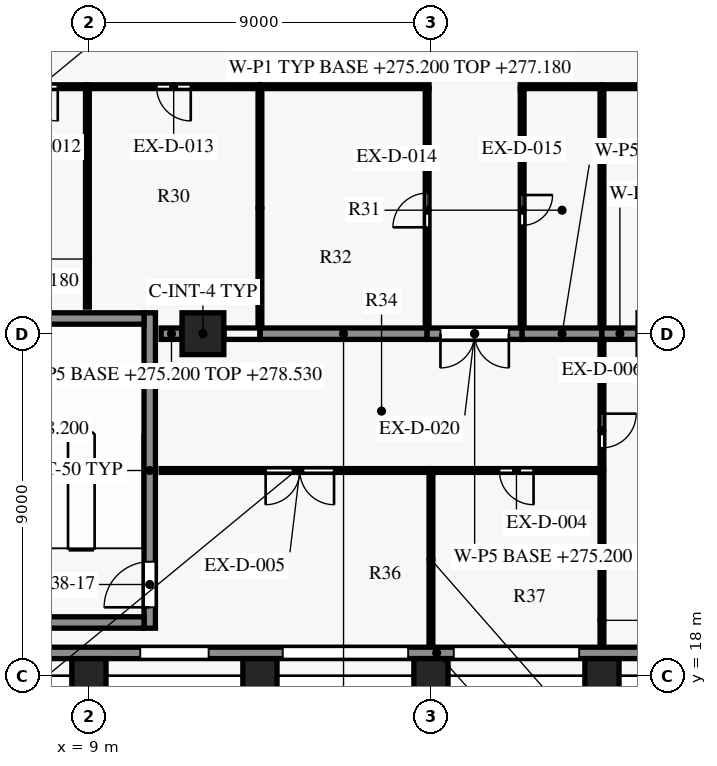
"""IFC4 building model, lengths in metres.
Left out: names, types, materials, properties, quantities, classifications, styles, units other than length and angle.
Written with IfcOpenShell. Run it as: python <this file> out.ifc"""

import sys

from ifc_helpers import new_model, si_unit, direction, frame, frame_2d, origin, origin_2d, place, context, subcontext, project, spatial, rectangle, extrude, element, fill, save


model = new_model("IFC4")
c1 = context("Model", 3, precision=1e-05, world=origin(), true_north=direction((0.0, 1.0)))
c2 = subcontext(c1, "Body", "Model", "MODEL_VIEW")
j1 = project(units=[si_unit("LENGTHUNIT", "METRE"), si_unit("PLANEANGLEUNIT", "RADIAN")], contexts=[c1])
p1 = place(None, origin())
s1 = spatial("IfcSite", under=j1, at=p1, CompositionType="ELEMENT")
p2 = place(p1, origin())
s2 = spatial("IfcBuilding", under=s1, at=p2, CompositionType="ELEMENT")
p3 = place(p2, frame((0.0, 0.0, 275.2)))
s3 = spatial("IfcBuildingStorey", under=s2, at=p3, CompositionType="ELEMENT", Elevation=275.2)
for number, where, z_axis, x_axis in (
    (1, (9.0, 18.0, 0.0), (0.0, 0.0, 1.0), (1.0, 0.0, 0.0)),
    (2, (13.5, 18.0, 0.0), (0.0, 0.0, 1.0), (1.0, 0.0, 0.0)),
    (3, (18.0, 18.0, 0.0), (0.0, 0.0, 1.0), (1.0, 0.0, 0.0)),
    (4, (22.5, 18.0, 0.0), (0.0, 0.0, 1.0), (1.0, 0.0, 0.0)),
):
    element("IfcColumn", number, at=place(p3, frame(where, z_axis=z_axis, x_axis=x_axis)), inside=s3, PredefinedType="COLUMN", context=c2, shape_type="SweptSolid", body=[
        extrude(rectangle(XDim=0.9, YDim=0.9, at=origin_2d()), origin(), (0.0, 0.0, 1.0), 3.8),
    ])
p4 = place(p3, frame((12.0, 27.0, 0.0), z_axis=(0.0, 0.0, 1.0), x_axis=(1.0, 0.0, 0.0)))
e5 = element("IfcColumn", 5, at=p4, inside=s3, PredefinedType="COLUMN", context=c2, shape_type="SweptSolid", body=[
    extrude(rectangle(XDim=1.1, YDim=1.1, at=origin_2d()), origin(), (0.0, 0.0, 1.0), 3.8),
])
p5 = place(p3, frame((31.05, 18.6, 0.0), z_axis=(0.0, 0.0, 1.0), x_axis=(-1.0, 0.0, 0.0)))
e6 = element("IfcWall", 6, at=p5, inside=s3, PredefinedType="SOLIDWALL", context=c2, shape_type="SweptSolid", body=[
    extrude(rectangle(XDim=25.8, YDim=0.3, at=frame_2d((12.9, 0.0))), origin(), (0.0, 0.0, 1.0), 3.0),
])
p6 = place(p5, frame((0.9, 0.0, 0.75)))
e7 = element("IfcOpeningElement", 7, at=p6, cuts=e6, PredefinedType="OPENING", context=c2, shape_type="SweptSolid", body=[
    extrude(rectangle(XDim=1.8, YDim=1.8, at=frame_2d((0.9, 0.9))), frame((0.0, 0.16, 0.0), z_axis=(0.0, -1.0, 0.0), x_axis=(1.0, 0.0, 0.0)), (0.0, 0.0, 1.0), 0.32),
])
p7 = place(p5, frame((5.4, 0.0, 0.75)))
e8 = element("IfcOpeningElement", 8, at=p7, cuts=e6, PredefinedType="OPENING", context=c2, shape_type="SweptSolid", body=[
    extrude(rectangle(XDim=1.8, YDim=1.8, at=frame_2d((0.9, 0.9))), frame((0.0, 0.16, 0.0), z_axis=(0.0, -1.0, 0.0), x_axis=(1.0, 0.0, 0.0)), (0.0, 0.0, 1.0), 0.32),
])
p8 = place(p5, frame((9.15, 0.0, 0.15)))
e9 = element("IfcOpeningElement", 9, at=p8, cuts=e6, PredefinedType="OPENING", context=c2, shape_type="SweptSolid", body=[
    extrude(rectangle(XDim=3.3, YDim=2.4, at=frame_2d((1.65, 1.2))), frame((0.0, 0.16, 0.0), z_axis=(0.0, -1.0, 0.0), x_axis=(1.0, 0.0, 0.0)), (0.0, 0.0, 1.0), 0.32),
])
p9 = place(p5, frame((13.65, 0.0, 0.15)))
e10 = element("IfcOpeningElement", 10, at=p9, cuts=e6, PredefinedType="OPENING", context=c2, shape_type="SweptSolid", body=[
    extrude(rectangle(XDim=3.3, YDim=2.4, at=frame_2d((1.65, 1.2))), frame((0.0, 0.16, 0.0), z_axis=(0.0, -1.0, 0.0), x_axis=(1.0, 0.0, 0.0)), (0.0, 0.0, 1.0), 0.32),
])
p10 = place(p5, frame((18.9, 0.0, 0.75)))
e11 = element("IfcOpeningElement", 11, at=p10, cuts=e6, PredefinedType="OPENING", context=c2, shape_type="SweptSolid", body=[
    extrude(rectangle(XDim=1.8, YDim=1.8, at=frame_2d((0.9, 0.9))), frame((0.0, 0.16, 0.0), z_axis=(0.0, -1.0, 0.0), x_axis=(1.0, 0.0, 0.0)), (0.0, 0.0, 1.0), 0.32),
])
for number, where, z_axis, x_axis in (
    (12, (7.15, 19.4, 0.0), (0.0, 0.0, 1.0), (1.0, 0.0, 0.0)),
    (13, (7.15, 27.4, 0.0), (0.0, 0.0, 1.0), (1.0, 0.0, 0.0)),
):
    element("IfcWall", number, at=place(p3, frame(where, z_axis=z_axis, x_axis=x_axis)), inside=s3, PredefinedType="SHEAR", context=c2, shape_type="SweptSolid", body=[
        extrude(rectangle(XDim=3.3, YDim=0.3, at=frame_2d((1.65, 0.0))), origin(), (0.0, 0.0, 1.0), 3.5),
    ])
p11 = place(p3, frame((10.6, 19.25, 0.0), z_axis=(0.0, 0.0, 1.0), x_axis=(0.0, 1.0, 0.0)))
e14 = element("IfcWall", 14, at=p11, inside=s3, PredefinedType="SHEAR", context=c2, shape_type="SweptSolid", body=[
    extrude(rectangle(XDim=8.3, YDim=0.3, at=frame_2d((4.15, 0.0))), origin(), (0.0, 0.0, 1.0), 3.5),
])
p12 = place(p11, frame((0.55, 0.0, 0.0)))
e15 = element("IfcOpeningElement", 15, at=p12, cuts=e14, PredefinedType="OPENING", context=c2, shape_type="SweptSolid", body=[
    extrude(rectangle(XDim=1.2, YDim=2.2, at=frame_2d((0.6, 1.1))), frame((0.0, 0.16, 0.0), z_axis=(0.0, -1.0, 0.0), x_axis=(1.0, 0.0, 0.0)), (0.0, 0.0, 1.0), 0.32),
])
p13 = place(p3, frame((18.0, 18.77, 0.0), z_axis=(0.0, 0.0, 1.0), x_axis=(0.0, 1.0, 0.0)))
e16 = element("IfcWall", 16, at=p13, inside=s3, PredefinedType="PARTITIONING", context=c2, shape_type="SweptSolid", body=[
    extrude(rectangle(XDim=4.58, YDim=0.1, at=frame_2d((2.29, 0.0))), origin(), (0.0, 0.0, 1.0), 2.98),
])
p14 = place(p3, frame((22.5, 23.35, 0.0), z_axis=(0.0, 0.0, 1.0), x_axis=(0.0, -1.0, 0.0)))
e17 = element("IfcWall", 17, at=p14, inside=s3, PredefinedType="PARTITIONING", context=c2, shape_type="SweptSolid", body=[
    extrude(rectangle(XDim=4.58, YDim=0.1, at=frame_2d((2.29, 0.0))), origin(), (0.0, 0.0, 1.0), 3.33),
])
p15 = place(p3, frame((18.0, 23.4, 0.0), z_axis=(0.0, 0.0, 1.0), x_axis=(-1.0, 0.0, 0.0)))
e18 = element("IfcWall", 18, at=p15, inside=s3, PredefinedType="PARTITIONING", context=c2, shape_type="SweptSolid", body=[
    extrude(rectangle(XDim=7.1, YDim=0.1, at=frame_2d((3.55, 0.0))), origin(), (0.0, 0.0, 1.0), 2.73),
])
p16 = place(p15, frame((2.55, 0.0, 0.0)))
e19 = element("IfcOpeningElement", 19, at=p16, cuts=e18, PredefinedType="OPENING", context=c2, shape_type="SweptSolid", body=[
    extrude(rectangle(XDim=1.8, YDim=2.1, at=frame_2d((0.9, 1.05))), frame((0.0, 0.06, 0.0), z_axis=(0.0, -1.0, 0.0), x_axis=(1.0, 0.0, 0.0)), (0.0, 0.0, 1.0), 0.12),
])
p17 = place(p3, frame((22.45, 23.4, 0.0), z_axis=(0.0, 0.0, 1.0), x_axis=(-1.0, 0.0, 0.0)))
e20 = element("IfcWall", 20, at=p17, inside=s3, PredefinedType="PARTITIONING", context=c2, shape_type="SweptSolid", body=[
    extrude(rectangle(XDim=4.45, YDim=0.1, at=frame_2d((2.225, 0.0))), origin(), (0.0, 0.0, 1.0), 2.98),
])
p18 = place(p17, frame((1.75, 0.0, 0.0)))
e21 = element("IfcOpeningElement", 21, at=p18, cuts=e20, PredefinedType="OPENING", context=c2, shape_type="SweptSolid", body=[
    extrude(rectangle(XDim=0.9, YDim=2.1, at=frame_2d((0.45, 1.05))), frame((0.0, 0.06, 0.0), z_axis=(0.0, -1.0, 0.0), x_axis=(1.0, 0.0, 0.0)), (0.0, 0.0, 1.0), 0.12),
])
p19 = place(p3, frame((22.5, 26.83, 0.0), z_axis=(0.0, 0.0, 1.0), x_axis=(0.0, -1.0, 0.0)))
e22 = element("IfcWall", 22, at=p19, inside=s3, PredefinedType="PARTITIONING", context=c2, shape_type="SweptSolid", body=[
    extrude(rectangle(XDim=3.38, YDim=0.1, at=frame_2d((1.69, 0.0))), origin(), (0.0, 0.0, 1.0), 1.98),
])
p20 = place(p19, frame((1.935, 0.0, 0.0)))
e23 = element("IfcOpeningElement", 23, at=p20, cuts=e22, PredefinedType="OPENING", context=c2, shape_type="SweptSolid", body=[
    extrude(rectangle(XDim=0.9, YDim=2.1, at=frame_2d((0.45, 1.05))), frame((0.0, 0.06, 0.0), z_axis=(0.0, -1.0, 0.0), x_axis=(1.0, 0.0, 0.0)), (0.0, 0.0, 1.0), 0.12),
])
p21 = place(p3, frame((10.9, 27.0, 0.0), z_axis=(0.0, 0.0, 1.0), x_axis=(1.0, 0.0, 0.0)))
e24 = element("IfcWall", 24, at=p21, inside=s3, PredefinedType="PARTITIONING", context=c2, shape_type="SweptSolid", body=[
    extrude(rectangle(XDim=0.545, YDim=0.3, at=frame_2d((0.272, 0.0))), origin(), (0.0, 0.0, 1.0), 3.33),
])
p22 = place(p3, frame((12.555, 27.0, 0.0), z_axis=(0.0, 0.0, 1.0), x_axis=(1.0, 0.0, 0.0)))
e25 = element("IfcWall", 25, at=p22, inside=s3, PredefinedType="PARTITIONING", context=c2, shape_type="SweptSolid", body=[
    extrude(rectangle(XDim=0.945, YDim=0.3, at=frame_2d((0.473, 0.0))), origin(), (0.0, 0.0, 1.0), 1.98),
])
p23 = place(p3, frame((13.5, 27.0, 0.0), z_axis=(0.0, 0.0, 1.0), x_axis=(1.0, 0.0, 0.0)))
e26 = element("IfcWall", 26, at=p23, inside=s3, PredefinedType="PARTITIONING", context=c2, shape_type="SweptSolid", body=[
    extrude(rectangle(XDim=4.4, YDim=0.3, at=frame_2d((2.2, 0.0))), origin(), (0.0, 0.0, 1.0), 1.98),
])
p24 = place(p3, frame((20.4, 27.0, 0.0), z_axis=(0.0, 0.0, 1.0), x_axis=(-1.0, 0.0, 0.0)))
e27 = element("IfcWall", 27, at=p24, inside=s3, PredefinedType="PARTITIONING", context=c2, shape_type="SweptSolid", body=[
    extrude(rectangle(XDim=2.5, YDim=0.3, at=frame_2d((1.25, 0.0))), origin(), (0.0, 0.0, 1.0), 2.73),
])
p25 = place(p24, frame((0.35, 0.0, 0.0)))
e28 = element("IfcOpeningElement", 28, at=p25, cuts=e27, PredefinedType="OPENING", context=c2, shape_type="SweptSolid", body=[
    extrude(rectangle(XDim=1.8, YDim=2.1, at=frame_2d((0.9, 1.05))), frame((0.0, 0.16, 0.0), z_axis=(0.0, -1.0, 0.0), x_axis=(1.0, 0.0, 0.0)), (0.0, 0.0, 1.0), 0.32),
])
p26 = place(p3, frame((20.4, 27.0, 0.0), z_axis=(0.0, 0.0, 1.0), x_axis=(1.0, 0.0, 0.0)))
e29 = element("IfcWall", 29, at=p26, inside=s3, PredefinedType="PARTITIONING", context=c2, shape_type="SweptSolid", body=[
    extrude(rectangle(XDim=2.1, YDim=0.3, at=frame_2d((1.05, 0.0))), origin(), (0.0, 0.0, 1.0), 1.98),
])
p27 = place(p3, frame((22.5, 27.0, 0.0), z_axis=(0.0, 0.0, 1.0), x_axis=(1.0, 0.0, 0.0)))
e30 = element("IfcWall", 30, at=p27, inside=s3, PredefinedType="PARTITIONING", context=c2, shape_type="SweptSolid", body=[
    extrude(rectangle(XDim=0.945, YDim=0.3, at=frame_2d((0.473, 0.0))), origin(), (0.0, 0.0, 1.0), 1.98),
])
p28 = place(p3, frame((17.9, 27.17, 0.0), z_axis=(0.0, 0.0, 1.0), x_axis=(0.0, 1.0, 0.0)))
e31 = element("IfcWall", 31, at=p28, inside=s3, PredefinedType="PARTITIONING", context=c2, shape_type="SweptSolid", body=[
    extrude(rectangle(XDim=6.28, YDim=0.1, at=frame_2d((3.14, 0.0))), origin(), (0.0, 0.0, 1.0), 2.73),
])
p29 = place(p28, frame((2.63, 0.0, 0.0)))
e32 = element("IfcOpeningElement", 32, at=p29, cuts=e31, PredefinedType="OPENING", context=c2, shape_type="SweptSolid", body=[
    extrude(rectangle(XDim=0.9, YDim=2.1, at=frame_2d((0.45, 1.05))), frame((0.0, 0.06, 0.0), z_axis=(0.0, -1.0, 0.0), x_axis=(1.0, 0.0, 0.0)), (0.0, 0.0, 1.0), 0.12),
])
p30 = place(p3, frame((8.96, 33.45, 0.0), z_axis=(0.0, 0.0, 1.0), x_axis=(0.0, -1.0, 0.0)))
e33 = element("IfcWall", 33, at=p30, inside=s3, PredefinedType="PARTITIONING", context=c2, shape_type="SweptSolid", body=[
    extrude(rectangle(XDim=5.75, YDim=0.1, at=frame_2d((2.875, 0.0))), origin(), (0.0, 0.0, 1.0), 3.33),
])
p31 = place(p3, frame((13.5, 33.45, 0.0), z_axis=(0.0, 0.0, 1.0), x_axis=(0.0, -1.0, 0.0)))
e34 = element("IfcWall", 34, at=p31, inside=s3, PredefinedType="PARTITIONING", context=c2, shape_type="SweptSolid", body=[
    extrude(rectangle(XDim=6.28, YDim=0.1, at=frame_2d((3.14, 0.0))), origin(), (0.0, 0.0, 1.0), 1.98),
])
p32 = place(p3, frame((20.4, 33.45, 0.0), z_axis=(0.0, 0.0, 1.0), x_axis=(0.0, -1.0, 0.0)))
e35 = element("IfcWall", 35, at=p32, inside=s3, PredefinedType="PARTITIONING", context=c2, shape_type="SweptSolid", body=[
    extrude(rectangle(XDim=6.28, YDim=0.1, at=frame_2d((3.14, 0.0))), origin(), (0.0, 0.0, 1.0), 2.73),
])
p33 = place(p32, frame((2.8, 0.0, 0.0)))
e36 = element("IfcOpeningElement", 36, at=p33, cuts=e35, PredefinedType="OPENING", context=c2, shape_type="SweptSolid", body=[
    extrude(rectangle(XDim=0.8, YDim=2.1, at=frame_2d((0.4, 1.05))), frame((0.0, 0.06, 0.0), z_axis=(0.0, -1.0, 0.0), x_axis=(1.0, 0.0, 0.0)), (0.0, 0.0, 1.0), 0.12),
])
p34 = place(p3, frame((22.5, 33.45, 0.0), z_axis=(0.0, 0.0, 1.0), x_axis=(0.0, -1.0, 0.0)))
e37 = element("IfcWall", 37, at=p34, inside=s3, PredefinedType="PARTITIONING", context=c2, shape_type="SweptSolid", body=[
    extrude(rectangle(XDim=6.28, YDim=0.1, at=frame_2d((3.14, 0.0))), origin(), (0.0, 0.0, 1.0), 1.98),
])
p35 = place(p3, frame((8.96, 33.5, 0.0), z_axis=(0.0, 0.0, 1.0), x_axis=(-1.0, 0.0, 0.0)))
e38 = element("IfcWall", 38, at=p35, inside=s3, PredefinedType="PARTITIONING", context=c2, shape_type="SweptSolid", body=[
    extrude(rectangle(XDim=2.51, YDim=0.1, at=frame_2d((1.255, 0.0))), origin(), (0.0, 0.0, 1.0), 3.33),
])
p36 = place(p35, frame((0.78, 0.0, 0.0)))
e39 = element("IfcOpeningElement", 39, at=p36, cuts=e38, PredefinedType="OPENING", context=c2, shape_type="SweptSolid", body=[
    extrude(rectangle(XDim=0.9, YDim=2.1, at=frame_2d((0.45, 1.05))), frame((0.0, 0.06, 0.0), z_axis=(0.0, -1.0, 0.0), x_axis=(1.0, 0.0, 0.0)), (0.0, 0.0, 1.0), 0.12),
])
p37 = place(p3, frame((13.5, 33.5, 0.0), z_axis=(0.0, 0.0, 1.0), x_axis=(-1.0, 0.0, 0.0)))
e40 = element("IfcWall", 40, at=p37, inside=s3, PredefinedType="PARTITIONING", context=c2, shape_type="SweptSolid", body=[
    extrude(rectangle(XDim=4.54, YDim=0.1, at=frame_2d((2.27, 0.0))), origin(), (0.0, 0.0, 1.0), 1.98),
])
p38 = place(p37, frame((1.82, 0.0, 0.0)))
e41 = element("IfcOpeningElement", 41, at=p38, cuts=e40, PredefinedType="OPENING", context=c2, shape_type="SweptSolid", body=[
    extrude(rectangle(XDim=0.9, YDim=2.1, at=frame_2d((0.45, 1.05))), frame((0.0, 0.06, 0.0), z_axis=(0.0, -1.0, 0.0), x_axis=(1.0, 0.0, 0.0)), (0.0, 0.0, 1.0), 0.12),
])
p39 = place(p3, frame((17.95, 33.5, 0.0), z_axis=(0.0, 0.0, 1.0), x_axis=(-1.0, 0.0, 0.0)))
e42 = element("IfcWall", 42, at=p39, inside=s3, PredefinedType="PARTITIONING", context=c2, shape_type="SweptSolid", body=[
    extrude(rectangle(XDim=4.45, YDim=0.1, at=frame_2d((2.225, 0.0))), origin(), (0.0, 0.0, 1.0), 1.98),
])
p40 = place(p3, frame((22.5, 33.5, 0.0), z_axis=(0.0, 0.0, 1.0), x_axis=(-1.0, 0.0, 0.0)))
e43 = element("IfcWall", 43, at=p40, inside=s3, PredefinedType="PARTITIONING", context=c2, shape_type="SweptSolid", body=[
    extrude(rectangle(XDim=2.15, YDim=0.1, at=frame_2d((1.075, 0.0))), origin(), (0.0, 0.0, 1.0), 1.98),
])
p41 = place(p3, frame((31.05, 33.5, 0.0), z_axis=(0.0, 0.0, 1.0), x_axis=(-1.0, 0.0, 0.0)))
e44 = element("IfcWall", 44, at=p41, inside=s3, PredefinedType="PARTITIONING", context=c2, shape_type="SweptSolid", body=[
    extrude(rectangle(XDim=8.55, YDim=0.1, at=frame_2d((4.275, 0.0))), origin(), (0.0, 0.0, 1.0), 1.98),
])
p42 = place(p41, frame((3.85, 0.0, 0.0)))
e45 = element("IfcOpeningElement", 45, at=p42, cuts=e44, PredefinedType="OPENING", context=c2, shape_type="SweptSolid", body=[
    extrude(rectangle(XDim=0.9, YDim=2.1, at=frame_2d((0.45, 1.05))), frame((0.0, 0.06, 0.0), z_axis=(0.0, -1.0, 0.0), x_axis=(1.0, 0.0, 0.0)), (0.0, 0.0, 1.0), 0.12),
])
p43 = place(p8, origin())
e46 = element("IfcWindow", 46, at=p43, inside=s3, PartitioningType="SINGLE_PANEL", PredefinedType="WINDOW", context=c2, shape_type="SweptSolid", body=[
    extrude(rectangle(XDim=3.3, YDim=2.4, at=frame_2d((1.65, 1.2))), frame((0.0, 0.03, 0.0), z_axis=(0.0, -1.0, 0.0), x_axis=(1.0, 0.0, 0.0)), (0.0, 0.0, 1.0), 0.06),
])
fill(e9, e46)
p44 = place(p9, origin())
e47 = element("IfcWindow", 47, at=p44, inside=s3, PartitioningType="SINGLE_PANEL", PredefinedType="WINDOW", context=c2, shape_type="SweptSolid", body=[
    extrude(rectangle(XDim=3.3, YDim=2.4, at=frame_2d((1.65, 1.2))), frame((0.0, 0.03, 0.0), z_axis=(0.0, -1.0, 0.0), x_axis=(1.0, 0.0, 0.0)), (0.0, 0.0, 1.0), 0.06),
])
fill(e10, e47)
p45 = place(p10, origin())
e48 = element("IfcWindow", 48, at=p45, inside=s3, PartitioningType="SINGLE_PANEL", PredefinedType="WINDOW", context=c2, shape_type="SweptSolid", body=[
    extrude(rectangle(XDim=1.8, YDim=1.8, at=frame_2d((0.9, 0.9))), frame((0.0, 0.03, 0.0), z_axis=(0.0, -1.0, 0.0), x_axis=(1.0, 0.0, 0.0)), (0.0, 0.0, 1.0), 0.06),
])
fill(e11, e48)
p46 = place(p12, origin())
e49 = element("IfcDoor", 49, at=p46, inside=s3, OperationType="SINGLE_SWING_RIGHT", PredefinedType="DOOR", context=c2, shape_type="SweptSolid", body=[
    extrude(rectangle(XDim=1.2, YDim=2.2, at=frame_2d((0.6, 1.1))), frame((0.0, 0.025, 0.0), z_axis=(0.0, -1.0, 0.0), x_axis=(1.0, 0.0, 0.0)), (0.0, 0.0, 1.0), 0.05),
])
fill(e15, e49)
p47 = place(p18, origin())
e50 = element("IfcDoor", 50, at=p47, inside=s3, OperationType="SINGLE_SWING_RIGHT", PredefinedType="DOOR", context=c2, shape_type="SweptSolid", body=[
    extrude(rectangle(XDim=0.9, YDim=2.1, at=frame_2d((0.45, 1.05))), frame((0.0, 0.025, 0.0), z_axis=(0.0, -1.0, 0.0), x_axis=(1.0, 0.0, 0.0)), (0.0, 0.0, 1.0), 0.05),
])
fill(e21, e50)
p48 = place(p16, origin())
e51 = element("IfcDoor", 51, at=p48, inside=s3, OperationType="DOUBLE_DOOR_SINGLE_SWING", PredefinedType="DOOR", context=c2, shape_type="SweptSolid", body=[
    extrude(rectangle(XDim=1.8, YDim=2.1, at=frame_2d((0.9, 1.05))), frame((0.0, 0.025, 0.0), z_axis=(0.0, -1.0, 0.0), x_axis=(1.0, 0.0, 0.0)), (0.0, 0.0, 1.0), 0.05),
])
fill(e19, e51)
p49 = place(p20, origin())
e52 = element("IfcDoor", 52, at=p49, inside=s3, OperationType="SINGLE_SWING_LEFT", PredefinedType="DOOR", context=c2, shape_type="SweptSolid", body=[
    extrude(rectangle(XDim=0.9, YDim=2.1, at=frame_2d((0.45, 1.05))), frame((0.0, 0.025, 0.0), z_axis=(0.0, -1.0, 0.0), x_axis=(1.0, 0.0, 0.0)), (0.0, 0.0, 1.0), 0.05),
])
fill(e23, e52)
p50 = place(p36, origin())
e53 = element("IfcDoor", 53, at=p50, inside=s3, OperationType="SINGLE_SWING_LEFT", PredefinedType="DOOR", context=c2, shape_type="SweptSolid", body=[
    extrude(rectangle(XDim=0.9, YDim=2.1, at=frame_2d((0.45, 1.05))), frame((0.0, 0.025, 0.0), z_axis=(0.0, -1.0, 0.0), x_axis=(1.0, 0.0, 0.0)), (0.0, 0.0, 1.0), 0.05),
])
fill(e39, e53)
p51 = place(p38, origin())
e54 = element("IfcDoor", 54, at=p51, inside=s3, OperationType="SINGLE_SWING_LEFT", PredefinedType="DOOR", context=c2, shape_type="SweptSolid", body=[
    extrude(rectangle(XDim=0.9, YDim=2.1, at=frame_2d((0.45, 1.05))), frame((0.0, 0.025, 0.0), z_axis=(0.0, -1.0, 0.0), x_axis=(1.0, 0.0, 0.0)), (0.0, 0.0, 1.0), 0.05),
])
fill(e41, e54)
p52 = place(p29, origin())
e55 = element("IfcDoor", 55, at=p52, inside=s3, OperationType="SINGLE_SWING_RIGHT", PredefinedType="DOOR", context=c2, shape_type="SweptSolid", body=[
    extrude(rectangle(XDim=0.9, YDim=2.1, at=frame_2d((0.45, 1.05))), frame((0.0, 0.025, 0.0), z_axis=(0.0, -1.0, 0.0), x_axis=(1.0, 0.0, 0.0)), (0.0, 0.0, 1.0), 0.05),
])
fill(e32, e55)
p53 = place(p33, origin())
e56 = element("IfcDoor", 56, at=p53, inside=s3, OperationType="SINGLE_SWING_LEFT", PredefinedType="DOOR", context=c2, shape_type="SweptSolid", body=[
    extrude(rectangle(XDim=0.8, YDim=2.1, at=frame_2d((0.4, 1.05))), frame((0.0, 0.025, 0.0), z_axis=(0.0, -1.0, 0.0), x_axis=(1.0, 0.0, 0.0)), (0.0, 0.0, 1.0), 0.05),
])
fill(e36, e56)
p54 = place(p25, origin())
e57 = element("IfcDoor", 57, at=p54, inside=s3, OperationType="DOUBLE_DOOR_SINGLE_SWING", PredefinedType="DOOR", context=c2, shape_type="SweptSolid", body=[
    extrude(rectangle(XDim=1.8, YDim=2.1, at=frame_2d((0.9, 1.05))), frame((0.0, 0.025, 0.0), z_axis=(0.0, -1.0, 0.0), x_axis=(1.0, 0.0, 0.0)), (0.0, 0.0, 1.0), 0.05),
])
fill(e28, e57)
save(model, sys.argv[1])
